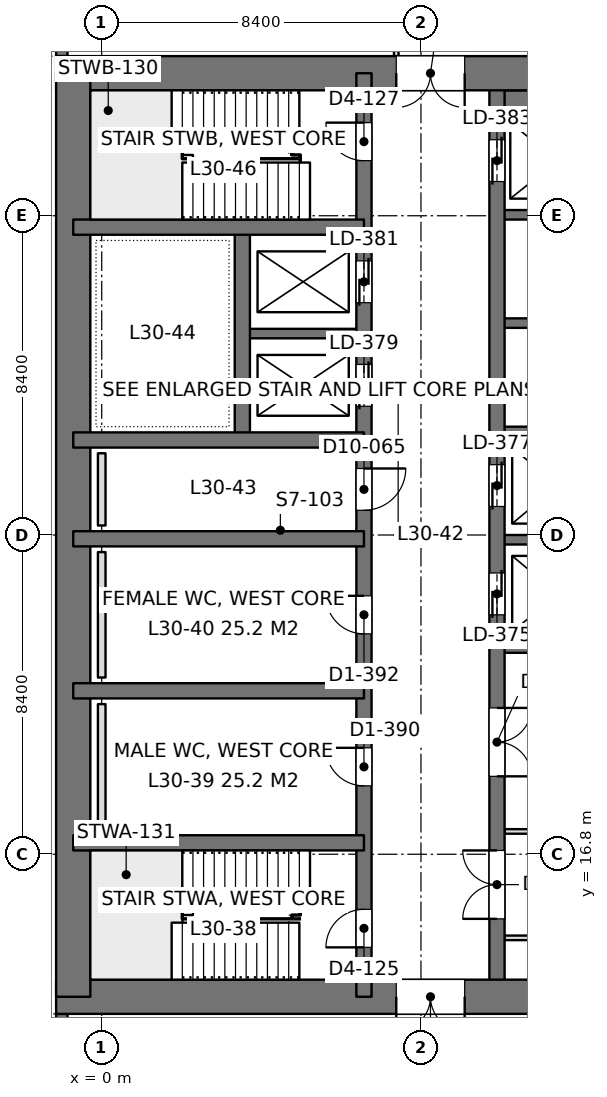
"""IFC4 building model, lengths in metres.
Left out: names, types, materials, properties, quantities, classifications, styles, units other than length and angle.
Written with IfcOpenShell. Run it as: python <this file> out.ifc"""

import sys

from ifc_helpers import new_model, si_unit, direction, frame, frame_2d, origin, place, context, subcontext, project, spatial, rectangle, extrude, element, fill, save


model = new_model("IFC4")
c1 = context("Model", 3, precision=1e-05, world=origin(), true_north=direction((0.0, 1.0)))
c2 = subcontext(c1, "Body", "Model", "MODEL_VIEW")
j1 = project(units=[si_unit("LENGTHUNIT", "METRE"), si_unit("PLANEANGLEUNIT", "RADIAN")], contexts=[c1])
p1 = place(None, origin())
s1 = spatial("IfcSite", under=j1, at=p1, CompositionType="ELEMENT")
p2 = place(p1, origin())
s2 = spatial("IfcBuilding", under=s1, at=p2, CompositionType="ELEMENT")
p3 = place(p2, frame((0.0, 0.0, 134.4)))
s3 = spatial("IfcBuildingStorey", under=s2, at=p3, CompositionType="ELEMENT", Elevation=134.4)
p4 = place(p3, frame((-1.2, 13.05, 0.0), z_axis=(0.0, 0.0, 1.0), x_axis=(1.0, 0.0, 0.0)))
e1 = element("IfcWall", 1, at=p4, inside=s3, PredefinedType="SHEAR", context=c2, shape_type="SweptSolid", body=[
    extrude(rectangle(XDim=18.0, YDim=0.9, at=frame_2d((9.0, 0.0))), origin(), (0.0, 0.0, 1.0), 4.2),
])
p5 = place(p4, frame((8.95, 0.0, 0.0)))
e2 = element("IfcOpeningElement", 2, at=p5, cuts=e1, PredefinedType="OPENING", context=c2, shape_type="SweptSolid", body=[
    extrude(rectangle(XDim=1.8, YDim=2.4, at=frame_2d((0.9, 1.2))), frame((0.0, 0.46, 0.0), z_axis=(0.0, -1.0, 0.0), x_axis=(1.0, 0.0, 0.0)), (0.0, 0.0, 1.0), 0.92),
])
p6 = place(p3, frame((-1.2, 37.35, 0.0), z_axis=(0.0, 0.0, 1.0), x_axis=(1.0, 0.0, 0.0)))
e3 = element("IfcWall", 3, at=p6, inside=s3, PredefinedType="SHEAR", context=c2, shape_type="SweptSolid", body=[
    extrude(rectangle(XDim=18.0, YDim=0.9, at=frame_2d((9.0, 0.0))), origin(), (0.0, 0.0, 1.0), 4.2),
])
p7 = place(p6, frame((8.95, 0.0, 0.0)))
e4 = element("IfcOpeningElement", 4, at=p7, cuts=e3, PredefinedType="OPENING", context=c2, shape_type="SweptSolid", body=[
    extrude(rectangle(XDim=1.8, YDim=2.4, at=frame_2d((0.9, 1.2))), frame((0.0, 0.46, 0.0), z_axis=(0.0, -1.0, 0.0), x_axis=(1.0, 0.0, 0.0)), (0.0, 0.0, 1.0), 0.92),
])
p8 = place(p3, frame((-0.75, 13.05, 0.0), z_axis=(0.0, 0.0, 1.0), x_axis=(0.0, 1.0, 0.0)))
e5 = element("IfcWall", 5, at=p8, inside=s3, PredefinedType="SHEAR", context=c2, shape_type="SweptSolid", body=[
    extrude(rectangle(XDim=24.3, YDim=0.9, at=frame_2d((12.15, 0.0))), origin(), (0.0, 0.0, 1.0), 4.2),
])
p9 = place(p3, frame((6.9, 13.05, 0.0), z_axis=(0.0, 0.0, 1.0), x_axis=(0.0, 1.0, 0.0)))
e6 = element("IfcWall", 6, at=p9, inside=s3, PredefinedType="SHEAR", context=c2, shape_type="SweptSolid", body=[
    extrude(rectangle(XDim=24.3, YDim=0.4, at=frame_2d((12.15, 0.0))), origin(), (0.0, 0.0, 1.0), 4.2),
])
p10 = place(p9, frame((1.3, 0.0, 0.0)))
e7 = element("IfcOpeningElement", 7, at=p10, cuts=e6, PredefinedType="OPENING", context=c2, shape_type="SweptSolid", body=[
    extrude(rectangle(XDim=1.0, YDim=2.2, at=frame_2d((0.5, 1.1))), frame((0.0, 0.21, 0.0), z_axis=(0.0, -1.0, 0.0), x_axis=(1.0, 0.0, 0.0)), (0.0, 0.0, 1.0), 0.42),
])
p11 = place(p9, frame((22.0, 0.0, 0.0)))
e8 = element("IfcOpeningElement", 8, at=p11, cuts=e6, PredefinedType="OPENING", context=c2, shape_type="SweptSolid", body=[
    extrude(rectangle(XDim=1.0, YDim=2.2, at=frame_2d((0.5, 1.1))), frame((0.0, 0.21, 0.0), z_axis=(0.0, -1.0, 0.0), x_axis=(1.0, 0.0, 0.0)), (0.0, 0.0, 1.0), 0.42),
])
p12 = place(p9, frame((5.55, 0.0, 0.0)))
e9 = element("IfcOpeningElement", 9, at=p12, cuts=e6, PredefinedType="OPENING", context=c2, shape_type="SweptSolid", body=[
    extrude(rectangle(XDim=1.0, YDim=2.2, at=frame_2d((0.5, 1.1))), frame((0.0, 0.21, 0.0), z_axis=(0.0, -1.0, 0.0), x_axis=(1.0, 0.0, 0.0)), (0.0, 0.0, 1.0), 0.42),
])
p13 = place(p9, frame((9.55, 0.0, 0.0)))
e10 = element("IfcOpeningElement", 10, at=p13, cuts=e6, PredefinedType="OPENING", context=c2, shape_type="SweptSolid", body=[
    extrude(rectangle(XDim=1.0, YDim=2.2, at=frame_2d((0.5, 1.1))), frame((0.0, 0.21, 0.0), z_axis=(0.0, -1.0, 0.0), x_axis=(1.0, 0.0, 0.0)), (0.0, 0.0, 1.0), 0.42),
])
p14 = place(p9, frame((12.8, 0.0, 0.0)))
e11 = element("IfcOpeningElement", 11, at=p14, cuts=e6, PredefinedType="OPENING", context=c2, shape_type="SweptSolid", body=[
    extrude(rectangle(XDim=1.1, YDim=2.2, at=frame_2d((0.55, 1.1))), frame((0.0, 0.21, 0.0), z_axis=(0.0, -1.0, 0.0), x_axis=(1.0, 0.0, 0.0)), (0.0, 0.0, 1.0), 0.42),
])
p15 = place(p9, frame((15.538, 0.0, 0.0)))
e12 = element("IfcOpeningElement", 12, at=p15, cuts=e6, PredefinedType="OPENING", context=c2, shape_type="SweptSolid", body=[
    extrude(rectangle(XDim=1.1, YDim=2.2, at=frame_2d((0.55, 1.1))), frame((0.0, 0.21, 0.0), z_axis=(0.0, -1.0, 0.0), x_axis=(1.0, 0.0, 0.0)), (0.0, 0.0, 1.0), 0.42),
])
p16 = place(p9, frame((18.262, 0.0, 0.0)))
e13 = element("IfcOpeningElement", 13, at=p16, cuts=e6, PredefinedType="OPENING", context=c2, shape_type="SweptSolid", body=[
    extrude(rectangle(XDim=1.1, YDim=2.2, at=frame_2d((0.55, 1.1))), frame((0.0, 0.21, 0.0), z_axis=(0.0, -1.0, 0.0), x_axis=(1.0, 0.0, 0.0)), (0.0, 0.0, 1.0), 0.42),
])
p17 = place(p3, frame((10.4, 13.05, 0.0), z_axis=(0.0, 0.0, 1.0), x_axis=(0.0, 1.0, 0.0)))
e14 = element("IfcWall", 14, at=p17, inside=s3, PredefinedType="SHEAR", context=c2, shape_type="SweptSolid", body=[
    extrude(rectangle(XDim=24.3, YDim=0.4, at=frame_2d((12.15, 0.0))), origin(), (0.0, 0.0, 1.0), 4.2),
])
p18 = place(p17, frame((10.05, 0.0, 0.0)))
e15 = element("IfcOpeningElement", 15, at=p18, cuts=e14, PredefinedType="OPENING", context=c2, shape_type="SweptSolid", body=[
    extrude(rectangle(XDim=1.1, YDim=2.2, at=frame_2d((0.55, 1.1))), frame((0.0, 0.21, 0.0), z_axis=(0.0, -1.0, 0.0), x_axis=(1.0, 0.0, 0.0)), (0.0, 0.0, 1.0), 0.42),
])
p19 = place(p17, frame((12.9, 0.0, 0.0)))
e16 = element("IfcOpeningElement", 16, at=p19, cuts=e14, PredefinedType="OPENING", context=c2, shape_type="SweptSolid", body=[
    extrude(rectangle(XDim=1.1, YDim=2.2, at=frame_2d((0.55, 1.1))), frame((0.0, 0.21, 0.0), z_axis=(0.0, -1.0, 0.0), x_axis=(1.0, 0.0, 0.0)), (0.0, 0.0, 1.0), 0.42),
])
p20 = place(p17, frame((21.45, 0.0, 0.0)))
e17 = element("IfcOpeningElement", 17, at=p20, cuts=e14, PredefinedType="OPENING", context=c2, shape_type="SweptSolid", body=[
    extrude(rectangle(XDim=1.1, YDim=2.2, at=frame_2d((0.55, 1.1))), frame((0.0, 0.21, 0.0), z_axis=(0.0, -1.0, 0.0), x_axis=(1.0, 0.0, 0.0)), (0.0, 0.0, 1.0), 0.42),
])
p21 = place(p17, frame((2.05, 0.0, 0.0)))
e18 = element("IfcOpeningElement", 18, at=p21, cuts=e14, PredefinedType="OPENING", context=c2, shape_type="SweptSolid", body=[
    extrude(rectangle(XDim=1.8, YDim=2.4, at=frame_2d((0.9, 1.2))), frame((0.0, 0.21, 0.0), z_axis=(0.0, -1.0, 0.0), x_axis=(1.0, 0.0, 0.0)), (0.0, 0.0, 1.0), 0.42),
])
p22 = place(p17, frame((5.8, 0.0, 0.0)))
e19 = element("IfcOpeningElement", 19, at=p22, cuts=e14, PredefinedType="OPENING", context=c2, shape_type="SweptSolid", body=[
    extrude(rectangle(XDim=1.8, YDim=2.4, at=frame_2d((0.9, 1.2))), frame((0.0, 0.21, 0.0), z_axis=(0.0, -1.0, 0.0), x_axis=(1.0, 0.0, 0.0)), (0.0, 0.0, 1.0), 0.42),
])
for number, where, z_axis, x_axis in (
    (20, (-0.75, 17.1, 0.0), (0.0, 0.0, 1.0), (1.0, 0.0, 0.0)),
    (21, (-0.75, 21.1, 0.0), (0.0, 0.0, 1.0), (1.0, 0.0, 0.0)),
    (22, (-0.75, 25.1, 0.0), (0.0, 0.0, 1.0), (1.0, 0.0, 0.0)),
    (23, (-0.75, 27.7, 0.0), (0.0, 0.0, 1.0), (1.0, 0.0, 0.0)),
    (24, (-0.75, 33.3, 0.0), (0.0, 0.0, 1.0), (1.0, 0.0, 0.0)),
):
    element("IfcWall", number, at=place(p3, frame(where, z_axis=z_axis, x_axis=x_axis)), inside=s3, PredefinedType="SHEAR", context=c2, shape_type="SweptSolid", body=[
        extrude(rectangle(XDim=7.65, YDim=0.4, at=frame_2d((3.825, 0.0))), origin(), (0.0, 0.0, 1.0), 4.2),
    ])
p23 = place(p3, frame((3.7, 27.7, 0.0), z_axis=(0.0, 0.0, 1.0), x_axis=(0.0, 1.0, 0.0)))
e25 = element("IfcWall", 25, at=p23, inside=s3, PredefinedType="SHEAR", context=c2, shape_type="SweptSolid", body=[
    extrude(rectangle(XDim=5.6, YDim=0.4, at=frame_2d((2.8, 0.0))), origin(), (0.0, 0.0, 1.0), 4.2),
])
p24 = place(p3, frame((3.7, 30.5, 0.0), z_axis=(0.0, 0.0, 1.0), x_axis=(1.0, 0.0, 0.0)))
e26 = element("IfcWall", 26, at=p24, inside=s3, PredefinedType="SHEAR", context=c2, shape_type="SweptSolid", body=[
    extrude(rectangle(XDim=3.2, YDim=0.25, at=frame_2d((1.6, 0.0))), origin(), (0.0, 0.0, 1.0), 4.2),
])
p25 = place(p3, frame((10.4, 22.225, 0.0), z_axis=(0.0, 0.0, 1.0), x_axis=(1.0, 0.0, 0.0)))
e27 = element("IfcWall", 27, at=p25, inside=s3, PredefinedType="SHEAR", context=c2, shape_type="SweptSolid", body=[
    extrude(rectangle(XDim=5.95, YDim=0.25, at=frame_2d((2.975, 0.0))), origin(), (0.0, 0.0, 1.0), 4.2),
])
for number, where, z_axis, x_axis in (
    (28, (10.4, 25.075, 0.0), (0.0, 0.0, 1.0), (1.0, 0.0, 0.0)),
    (29, (10.4, 27.925, 0.0), (0.0, 0.0, 1.0), (1.0, 0.0, 0.0)),
    (30, (10.4, 30.775, 0.0), (0.0, 0.0, 1.0), (1.0, 0.0, 0.0)),
    (31, (10.4, 33.625, 0.0), (0.0, 0.0, 1.0), (1.0, 0.0, 0.0)),
):
    element("IfcWall", number, at=place(p3, frame(where, z_axis=z_axis, x_axis=x_axis)), inside=s3, PredefinedType="SHEAR", context=c2, shape_type="SweptSolid", body=[
        extrude(rectangle(XDim=3.2, YDim=0.25, at=frame_2d((1.6, 0.0))), origin(), (0.0, 0.0, 1.0), 4.2),
    ])
p26 = place(p3, frame((10.4, 36.625, 0.0), z_axis=(0.0, 0.0, 1.0), x_axis=(1.0, 0.0, 0.0)))
e32 = element("IfcWall", 32, at=p26, inside=s3, PredefinedType="SHEAR", context=c2, shape_type="SweptSolid", body=[
    extrude(rectangle(XDim=3.2, YDim=0.55, at=frame_2d((1.6, 0.0))), origin(), (0.0, 0.0, 1.0), 4.2),
])
p27 = place(p3, frame((-1.05, 8.4, 0.0), z_axis=(0.0, 0.0, 1.0), x_axis=(0.0, 1.0, 0.0)))
e33 = element("IfcWall", 33, at=p27, inside=s3, PredefinedType="SOLIDWALL", context=c2, shape_type="SweptSolid", body=[
    extrude(rectangle(XDim=4.2, YDim=0.3, at=frame_2d((2.1, 0.0))), origin(), (0.0, 0.0, 1.0), 4.05),
])
p28 = place(p27, frame((0.9, 0.0, 0.9)))
e34 = element("IfcOpeningElement", 34, at=p28, cuts=e33, PredefinedType="OPENING", context=c2, shape_type="SweptSolid", body=[
    extrude(rectangle(XDim=2.4, YDim=1.9, at=frame_2d((1.2, 0.95))), frame((0.0, 0.16, 0.0), z_axis=(0.0, -1.0, 0.0), x_axis=(1.0, 0.0, 0.0)), (0.0, 0.0, 1.0), 0.32),
])
p29 = place(p3, frame((-1.05, 37.8, 0.0), z_axis=(0.0, 0.0, 1.0), x_axis=(0.0, 1.0, 0.0)))
e35 = element("IfcWall", 35, at=p29, inside=s3, PredefinedType="SOLIDWALL", context=c2, shape_type="SweptSolid", body=[
    extrude(rectangle(XDim=4.2, YDim=0.3, at=frame_2d((2.1, 0.0))), origin(), (0.0, 0.0, 1.0), 4.05),
])
p30 = place(p29, frame((0.9, 0.0, 0.9)))
e36 = element("IfcOpeningElement", 36, at=p30, cuts=e35, PredefinedType="OPENING", context=c2, shape_type="SweptSolid", body=[
    extrude(rectangle(XDim=2.4, YDim=1.9, at=frame_2d((1.2, 0.95))), frame((0.0, 0.16, 0.0), z_axis=(0.0, -1.0, 0.0), x_axis=(1.0, 0.0, 0.0)), (0.0, 0.0, 1.0), 0.32),
])
p31 = place(p3, frame((10.598, 17.4, 0.0), z_axis=(0.0, 0.0, 1.0), x_axis=(1.0, 0.0, 0.0)))
e37 = element("IfcWall", 37, at=p31, inside=s3, PredefinedType="PARTITIONING", context=c2, shape_type="SweptSolid", body=[
    extrude(rectangle(XDim=5.904, YDim=0.12, at=frame_2d((2.952, 0.0))), origin(), (0.0, 0.0, 1.0), 3.55),
])
p32 = place(p31, frame((4.524, 0.0, 0.0)))
e38 = element("IfcOpeningElement", 38, at=p32, cuts=e37, PredefinedType="OPENING", context=c2, shape_type="SweptSolid", body=[
    extrude(rectangle(XDim=1.0, YDim=2.4, at=frame_2d((0.5, 1.2))), frame((0.0, 0.07, 0.0), z_axis=(0.0, -1.0, 0.0), x_axis=(1.0, 0.0, 0.0)), (0.0, 0.0, 1.0), 0.14),
])
p33 = place(p3, frame((10.598, 14.6, 0.0), z_axis=(0.0, 0.0, 1.0), x_axis=(1.0, 0.0, 0.0)))
e39 = element("IfcWall", 39, at=p33, inside=s3, PredefinedType="PARTITIONING", context=c2, shape_type="SweptSolid", body=[
    extrude(rectangle(XDim=6.204, YDim=0.12, at=frame_2d((3.102, 0.0))), origin(), (0.0, 0.0, 1.0), 3.55),
])
p34 = place(p3, frame((7.75, 37.8, 0.0), z_axis=(0.0, 0.0, 1.0), x_axis=(0.0, 1.0, 0.0)))
e40 = element("IfcWall", 40, at=p34, inside=s3, PredefinedType="PARTITIONING", context=c2, shape_type="SweptSolid", body=[
    extrude(rectangle(XDim=2.0, YDim=0.12, at=frame_2d((1.0, 0.0))), origin(), (0.0, 0.0, 1.0), 4.05),
])
for number, where, z_axis, x_axis in (
    (41, (0.0, 17.45, 0.0), (0.0, 0.0, 1.0), (0.0, 1.0, 0.0)),
    (42, (0.0, 21.45, 0.0), (0.0, 0.0, 1.0), (0.0, 1.0, 0.0)),
):
    element("IfcWall", number, at=place(p3, frame(where, z_axis=z_axis, x_axis=x_axis)), inside=s3, PredefinedType="PLUMBINGWALL", context=c2, shape_type="SweptSolid", body=[
        extrude(rectangle(XDim=3.3, YDim=0.2, at=frame_2d((1.65, 0.0))), origin(), (0.0, 0.0, 1.0), 1.2),
    ])
p35 = place(p3, frame((0.0, 25.45, 0.0), z_axis=(0.0, 0.0, 1.0), x_axis=(0.0, 1.0, 0.0)))
e43 = element("IfcWall", 43, at=p35, inside=s3, PredefinedType="PLUMBINGWALL", context=c2, shape_type="SweptSolid", body=[
    extrude(rectangle(XDim=1.9, YDim=0.2, at=frame_2d((0.95, 0.0))), origin(), (0.0, 0.0, 1.0), 1.2),
])
p36 = place(p5, frame((1.8, 0.0, 0.0), z_axis=(0.0, 0.0, 1.0), x_axis=(-1.0, 0.0, 0.0)))
e44 = element("IfcDoor", 44, at=p36, inside=s3, OperationType="DOUBLE_DOOR_SINGLE_SWING", PredefinedType="DOOR", context=c2, shape_type="SweptSolid", body=[
    extrude(rectangle(XDim=1.8, YDim=2.4, at=frame_2d((0.9, 1.2))), frame((0.0, 0.025, 0.0), z_axis=(0.0, -1.0, 0.0), x_axis=(1.0, 0.0, 0.0)), (0.0, 0.0, 1.0), 0.05),
])
fill(e2, e44)
p37 = place(p7, frame((1.8, 0.0, 0.0), z_axis=(0.0, 0.0, 1.0), x_axis=(-1.0, 0.0, 0.0)))
e45 = element("IfcDoor", 45, at=p37, inside=s3, OperationType="DOUBLE_DOOR_SINGLE_SWING", PredefinedType="DOOR", context=c2, shape_type="SweptSolid", body=[
    extrude(rectangle(XDim=1.8, YDim=2.4, at=frame_2d((0.9, 1.2))), frame((0.0, 0.025, 0.0), z_axis=(0.0, -1.0, 0.0), x_axis=(1.0, 0.0, 0.0)), (0.0, 0.0, 1.0), 0.05),
])
fill(e4, e45)
p38 = place(p10, origin())
e46 = element("IfcDoor", 46, at=p38, inside=s3, OperationType="SINGLE_SWING_LEFT", PredefinedType="DOOR", context=c2, shape_type="SweptSolid", body=[
    extrude(rectangle(XDim=1.0, YDim=2.2, at=frame_2d((0.5, 1.1))), frame((0.0, 0.025, 0.0), z_axis=(0.0, -1.0, 0.0), x_axis=(1.0, 0.0, 0.0)), (0.0, 0.0, 1.0), 0.05),
])
fill(e7, e46)
p39 = place(p11, origin())
e47 = element("IfcDoor", 47, at=p39, inside=s3, OperationType="SINGLE_SWING_RIGHT", PredefinedType="DOOR", context=c2, shape_type="SweptSolid", body=[
    extrude(rectangle(XDim=1.0, YDim=2.2, at=frame_2d((0.5, 1.1))), frame((0.0, 0.025, 0.0), z_axis=(0.0, -1.0, 0.0), x_axis=(1.0, 0.0, 0.0)), (0.0, 0.0, 1.0), 0.05),
])
fill(e8, e47)
p40 = place(p12, origin())
e48 = element("IfcDoor", 48, at=p40, inside=s3, OperationType="SINGLE_SWING_RIGHT", PredefinedType="DOOR", context=c2, shape_type="SweptSolid", body=[
    extrude(rectangle(XDim=1.0, YDim=2.2, at=frame_2d((0.5, 1.1))), frame((0.0, 0.025, 0.0), z_axis=(0.0, -1.0, 0.0), x_axis=(1.0, 0.0, 0.0)), (0.0, 0.0, 1.0), 0.05),
])
fill(e9, e48)
p41 = place(p13, origin())
e49 = element("IfcDoor", 49, at=p41, inside=s3, OperationType="SINGLE_SWING_RIGHT", PredefinedType="DOOR", context=c2, shape_type="SweptSolid", body=[
    extrude(rectangle(XDim=1.0, YDim=2.2, at=frame_2d((0.5, 1.1))), frame((0.0, 0.025, 0.0), z_axis=(0.0, -1.0, 0.0), x_axis=(1.0, 0.0, 0.0)), (0.0, 0.0, 1.0), 0.05),
])
fill(e10, e49)
p42 = place(p14, frame((1.1, 0.0, 0.0), z_axis=(0.0, 0.0, 1.0), x_axis=(-1.0, 0.0, 0.0)))
e50 = element("IfcDoor", 50, at=p42, inside=s3, OperationType="SINGLE_SWING_LEFT", PredefinedType="DOOR", context=c2, shape_type="SweptSolid", body=[
    extrude(rectangle(XDim=1.1, YDim=2.2, at=frame_2d((0.55, 1.1))), frame((0.0, 0.025, 0.0), z_axis=(0.0, -1.0, 0.0), x_axis=(1.0, 0.0, 0.0)), (0.0, 0.0, 1.0), 0.05),
])
fill(e11, e50)
p43 = place(p18, origin())
e51 = element("IfcDoor", 51, at=p43, inside=s3, OperationType="DOUBLE_DOOR_SLIDING", PredefinedType="DOOR", context=c2, shape_type="SweptSolid", body=[
    extrude(rectangle(XDim=1.1, YDim=2.2, at=frame_2d((0.55, 1.1))), frame((0.0, 0.025, 0.0), z_axis=(0.0, -1.0, 0.0), x_axis=(1.0, 0.0, 0.0)), (0.0, 0.0, 1.0), 0.05),
])
fill(e15, e51)
p44 = place(p19, origin())
e52 = element("IfcDoor", 52, at=p44, inside=s3, OperationType="DOUBLE_DOOR_SLIDING", PredefinedType="DOOR", context=c2, shape_type="SweptSolid", body=[
    extrude(rectangle(XDim=1.1, YDim=2.2, at=frame_2d((0.55, 1.1))), frame((0.0, 0.025, 0.0), z_axis=(0.0, -1.0, 0.0), x_axis=(1.0, 0.0, 0.0)), (0.0, 0.0, 1.0), 0.05),
])
fill(e16, e52)
p45 = place(p20, origin())
e53 = element("IfcDoor", 53, at=p45, inside=s3, OperationType="DOUBLE_DOOR_SLIDING", PredefinedType="DOOR", context=c2, shape_type="SweptSolid", body=[
    extrude(rectangle(XDim=1.1, YDim=2.2, at=frame_2d((0.55, 1.1))), frame((0.0, 0.025, 0.0), z_axis=(0.0, -1.0, 0.0), x_axis=(1.0, 0.0, 0.0)), (0.0, 0.0, 1.0), 0.05),
])
fill(e17, e53)
p46 = place(p15, origin())
e54 = element("IfcDoor", 54, at=p46, inside=s3, OperationType="DOUBLE_DOOR_SLIDING", PredefinedType="DOOR", context=c2, shape_type="SweptSolid", body=[
    extrude(rectangle(XDim=1.1, YDim=2.2, at=frame_2d((0.55, 1.1))), frame((0.0, 0.025, 0.0), z_axis=(0.0, -1.0, 0.0), x_axis=(1.0, 0.0, 0.0)), (0.0, 0.0, 1.0), 0.05),
])
fill(e12, e54)
p47 = place(p16, origin())
e55 = element("IfcDoor", 55, at=p47, inside=s3, OperationType="DOUBLE_DOOR_SLIDING", PredefinedType="DOOR", context=c2, shape_type="SweptSolid", body=[
    extrude(rectangle(XDim=1.1, YDim=2.2, at=frame_2d((0.55, 1.1))), frame((0.0, 0.025, 0.0), z_axis=(0.0, -1.0, 0.0), x_axis=(1.0, 0.0, 0.0)), (0.0, 0.0, 1.0), 0.05),
])
fill(e13, e55)
p48 = place(p21, origin())
e56 = element("IfcDoor", 56, at=p48, inside=s3, OperationType="DOUBLE_DOOR_SINGLE_SWING", PredefinedType="DOOR", context=c2, shape_type="SweptSolid", body=[
    extrude(rectangle(XDim=1.8, YDim=2.4, at=frame_2d((0.9, 1.2))), frame((0.0, 0.025, 0.0), z_axis=(0.0, -1.0, 0.0), x_axis=(1.0, 0.0, 0.0)), (0.0, 0.0, 1.0), 0.05),
])
fill(e18, e56)
p49 = place(p22, frame((1.8, 0.0, 0.0), z_axis=(0.0, 0.0, 1.0), x_axis=(-1.0, 0.0, 0.0)))
e57 = element("IfcDoor", 57, at=p49, inside=s3, OperationType="DOUBLE_DOOR_SINGLE_SWING", PredefinedType="DOOR", context=c2, shape_type="SweptSolid", body=[
    extrude(rectangle(XDim=1.8, YDim=2.4, at=frame_2d((0.9, 1.2))), frame((0.0, 0.025, 0.0), z_axis=(0.0, -1.0, 0.0), x_axis=(1.0, 0.0, 0.0)), (0.0, 0.0, 1.0), 0.05),
])
fill(e19, e57)
save(model, sys.argv[1])
